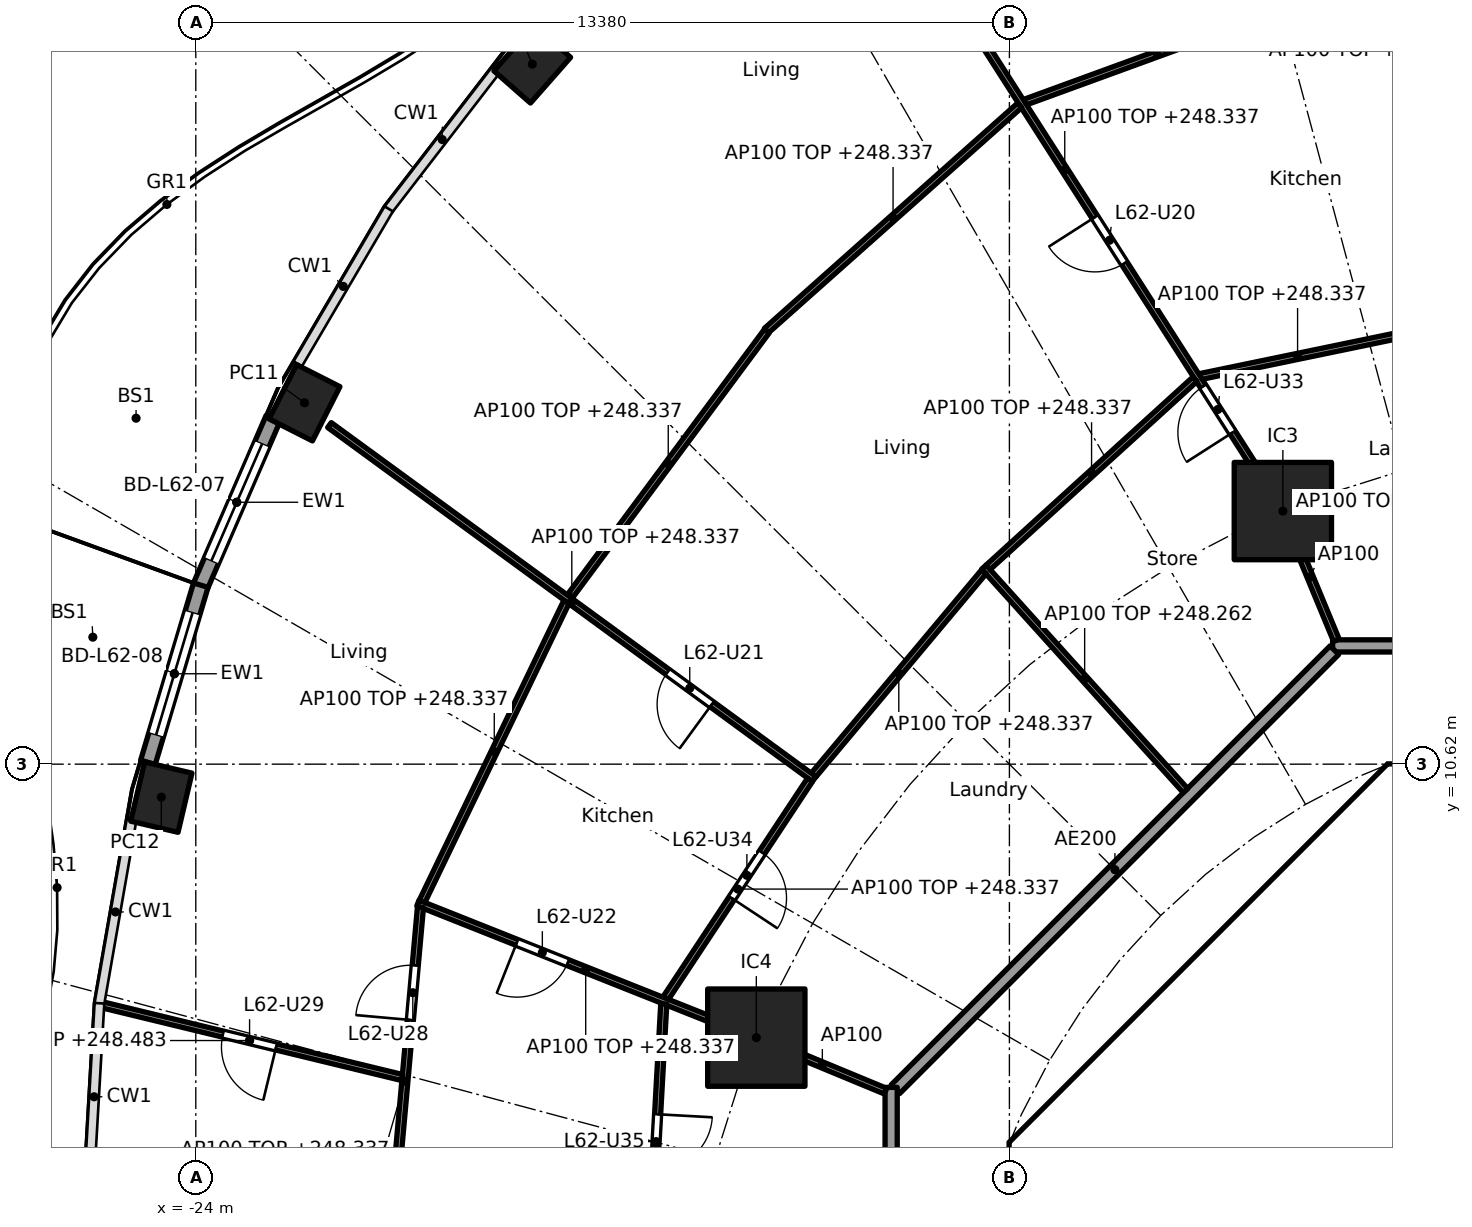
"""IFC4 building model, lengths in metres.
Left out: names, types, materials, properties, quantities, classifications, styles, units other than length and angle.
Written with IfcOpenShell. Run it as: python <this file> out.ifc"""

import sys

from ifc_helpers import new_model, si_unit, direction, frame, frame_2d, origin, origin_2d, place, context, subcontext, project, spatial, polyline, rectangle, hollow_rectangle, outline, extrude, element, fill, save


model = new_model("IFC4")
c1 = context("Model", 3, precision=1e-05, world=origin(), true_north=direction((0.0, 1.0)))
c2 = subcontext(c1, "Body", "Model", "MODEL_VIEW")
j1 = project(units=[si_unit("LENGTHUNIT", "METRE"), si_unit("PLANEANGLEUNIT", "RADIAN")], contexts=[c1])
p1 = place(None, origin())
s1 = spatial("IfcSite", under=j1, at=p1, CompositionType="ELEMENT")
p2 = place(p1, origin())
s2 = spatial("IfcBuilding", under=s1, at=p2, CompositionType="ELEMENT")
p3 = place(p2, frame((0.0, 0.0, 245.5)))
s3 = spatial("IfcBuildingStorey", under=s2, at=p3, CompositionType="ELEMENT", Elevation=245.5)
for number, where, z_axis, x_axis in (
    (1, (-18.467, 22.132, 0.0), (0.0, 0.0, 1.0), (-0.66, -0.751, 0.0)),
    (2, (-22.212, 16.563, 0.0), (0.0, 0.0, 1.0), (-0.452, -0.892, 0.0)),
    (3, (-24.567, 10.077, 0.0), (0.0, 0.0, 1.0), (-0.229, -0.973, 0.0)),
):
    element("IfcColumn", number, at=place(p3, frame(where, z_axis=z_axis, x_axis=x_axis)), inside=s3, PredefinedType="COLUMN", context=c2, shape_type="SweptSolid", body=[
        extrude(hollow_rectangle(XDim=1.0, YDim=0.8, WallThickness=0.032, at=origin_2d()), origin(), (0.0, 0.0, 1.0), 3.7),
    ])
for number, where, z_axis, x_axis in (
    (4, (-6.123, 14.782, 0.0), (0.0, 0.0, 1.0), (1.0, 0.0, 0.0)),
    (5, (-14.782, 6.123, 0.0), (0.0, 0.0, 1.0), (1.0, 0.0, 0.0)),
):
    element("IfcColumn", number, at=place(p3, frame(where, z_axis=z_axis, x_axis=x_axis)), inside=s3, PredefinedType="COLUMN", context=c2, shape_type="SweptSolid", body=[
        extrude(rectangle(XDim=1.6, YDim=1.6, at=origin_2d()), origin(), (0.0, 0.0, 1.0), 3.7),
    ])
p4 = place(p3, frame((-23.923, 13.55, 0.0), z_axis=(0.0, 0.0, 1.0), x_axis=(0.397685034628, 0.917521996048, 0.0)))
e6 = element("IfcWall", 6, at=p4, inside=s3, PredefinedType="SOLIDWALL", context=c2, shape_type="SweptSolid", body=[
    extrude(rectangle(XDim=3.002, YDim=0.25, at=frame_2d((1.501, 0.0))), origin(), (0.0, 0.0, 1.0), 3.44),
])
p5 = place(p4, frame((0.451, 0.0, 0.0)))
e7 = element("IfcOpeningElement", 7, at=p5, cuts=e6, PredefinedType="OPENING", context=c2, shape_type="SweptSolid", body=[
    extrude(rectangle(XDim=2.1, YDim=2.4, at=frame_2d((1.05, 1.2))), frame((0.0, 0.135, 0.0), z_axis=(0.0, -1.0, 0.0), x_axis=(1.0, 0.0, 0.0)), (0.0, 0.0, 1.0), 0.27),
])
p6 = place(p3, frame((-24.787, 10.65, 0.0), z_axis=(0.0, 0.0, 1.0), x_axis=(0.285859454825, 0.95827155446, 0.0)))
e8 = element("IfcWall", 8, at=p6, inside=s3, PredefinedType="SOLIDWALL", context=c2, shape_type="SweptSolid", body=[
    extrude(rectangle(XDim=3.041, YDim=0.25, at=frame_2d((1.52, 0.0))), origin(), (0.0, 0.0, 1.0), 3.44),
])
p7 = place(p6, frame((0.47, 0.0, 0.0)))
e9 = element("IfcOpeningElement", 9, at=p7, cuts=e8, PredefinedType="OPENING", context=c2, shape_type="SweptSolid", body=[
    extrude(rectangle(XDim=2.1, YDim=2.4, at=frame_2d((1.05, 1.2))), frame((0.0, 0.135, 0.0), z_axis=(0.0, -1.0, 0.0), x_axis=(1.0, 0.0, 0.0)), (0.0, 0.0, 1.0), 0.27),
])
p8 = place(p3, frame((-4.613, 9.988, 0.0), z_axis=(0.0, 0.0, 1.0), x_axis=(-0.707106781187, -0.707106781187, 0.0)))
e10 = element("IfcWall", 10, at=p8, inside=s3, PredefinedType="SHEAR", context=c2, shape_type="SweptSolid", body=[
    extrude(rectangle(XDim=7.602, YDim=0.6, at=frame_2d((3.801, 0.0))), origin(), (0.0, 0.0, 1.0), 3.44),
])
p9 = place(p8, frame((0.351, 0.0, 0.0)))
e11 = element("IfcOpeningElement", 11, at=p9, cuts=e10, PredefinedType="OPENING", context=c2, shape_type="SweptSolid", body=[
    extrude(rectangle(XDim=1.1, YDim=2.1, at=frame_2d((0.55, 1.05))), frame((0.0, 0.31, 0.0), z_axis=(0.0, -1.0, 0.0), x_axis=(1.0, 0.0, 0.0)), (0.0, 0.0, 1.0), 0.62),
])
p10 = place(p3, frame((-5.8, 4.3, 0.0), z_axis=(0.0, 0.0, 1.0), x_axis=(0.0, 1.0, 0.0)))
e12 = element("IfcWall", 12, at=p10, inside=s3, PredefinedType="PARTITIONING", context=c2, shape_type="SweptSolid", body=[
    extrude(rectangle(XDim=3.927, YDim=0.15, at=frame_2d((1.963, 0.0))), origin(), (0.0, 0.0, 1.0), 3.44),
])
p11 = place(p10, frame((0.413, 0.0, 0.0)))
e13 = element("IfcOpeningElement", 13, at=p11, cuts=e12, PredefinedType="OPENING", context=c2, shape_type="SweptSolid", body=[
    extrude(rectangle(XDim=0.9, YDim=2.1, at=frame_2d((0.45, 1.05))), frame((0.0, 0.085, 0.0), z_axis=(0.0, -1.0, 0.0), x_axis=(1.0, 0.0, 0.0)), (0.0, 0.0, 1.0), 0.17),
])
p12 = place(p10, frame((2.489, 0.0, 0.0)))
e14 = element("IfcOpeningElement", 14, at=p12, cuts=e12, PredefinedType="OPENING", context=c2, shape_type="SweptSolid", body=[
    extrude(rectangle(XDim=0.9, YDim=2.1, at=frame_2d((0.45, 1.05))), frame((0.0, 0.085, 0.0), z_axis=(0.0, -1.0, 0.0), x_axis=(1.0, 0.0, 0.0)), (0.0, 0.0, 1.0), 0.17),
])
p13 = place(p3, origin())
e15 = element("IfcWall", 15, at=p13, inside=s3, PredefinedType="SHEAR", context=c2, shape_type="SweptSolid", body=[
    extrude(outline(polyline([(-10.2, 4.825), (-9.776, 4.401), (-10.025, 4.152), (-10.025, 3.801), (-10.625, 3.801), (-10.625, 4.401), (-10.2, 4.825)])), origin(), (0.0, 0.0, 1.0), 3.44),
])
p14 = place(p3, origin())
e16 = element("IfcWall", 16, at=p14, inside=s3, PredefinedType="SHEAR", context=c2, shape_type="SweptSolid", body=[
    extrude(outline(polyline([(-4.152, 10.025), (-4.401, 9.776), (-4.825, 10.2), (-4.401, 10.625), (4.401, 10.625), (4.825, 10.2), (4.401, 9.776), (4.152, 10.025), (-4.152, 10.025)])), origin(), (0.0, 0.0, 1.0), 3.44),
])
p15 = place(p3, frame((-8.001, 6.1, 0.0), z_axis=(0.0, 0.0, 1.0), x_axis=(1.0, 0.0, 0.0)))
e17 = element("IfcWall", 17, at=p15, inside=s3, PredefinedType="PARTITIONING", context=c2, shape_type="SweptSolid", body=[
    extrude(rectangle(XDim=2.126, YDim=0.15, at=frame_2d((1.063, 0.0))), origin(), (0.0, 0.0, 1.0), 3.44),
])
p16 = place(p3, frame((5.104, 12.565, 0.0), z_axis=(0.0, 0.0, 1.0), x_axis=(-1.0, 0.0, 0.0)))
e18 = element("IfcWall", 18, at=p16, inside=s3, PredefinedType="PARTITIONING", context=c2, shape_type="SweptSolid", body=[
    extrude(rectangle(XDim=10.409, YDim=0.2, at=frame_2d((5.205, 0.0))), origin(), (0.0, 0.0, 1.0), 3.44),
])
p17 = place(p3, frame((-5.275, 12.494, 0.0), z_axis=(0.0, 0.0, 1.0), x_axis=(-0.707106781187, -0.707106781187, 0.0)))
e19 = element("IfcWall", 19, at=p17, inside=s3, PredefinedType="PARTITIONING", context=c2, shape_type="SweptSolid", body=[
    extrude(rectangle(XDim=10.209, YDim=0.2, at=frame_2d((5.104, 0.0))), origin(), (0.0, 0.0, 1.0), 3.44),
])
p18 = place(p3, frame((-12.565, 5.304, 0.0), z_axis=(0.0, 0.0, 1.0), x_axis=(0.0, -1.0, 0.0)))
e20 = element("IfcWall", 20, at=p18, inside=s3, PredefinedType="PARTITIONING", context=c2, shape_type="SweptSolid", body=[
    extrude(rectangle(XDim=10.409, YDim=0.2, at=frame_2d((5.205, 0.0))), origin(), (0.0, 0.0, 1.0), 3.44),
])
p19 = place(p3, frame((-4.28, 17.657, 0.0), z_axis=(0.0, 0.0, 1.0), x_axis=(-0.979205232861, -0.202872156637, 0.0)))
e21 = element("IfcWall", 21, at=p19, inside=s3, PredefinedType="PARTITIONING", context=c2, shape_type="SweptSolid", body=[
    extrude(rectangle(XDim=3.271, YDim=0.1, at=frame_2d((1.635, 0.0))), origin(), (0.0, 0.0, 1.0), 2.837),
])
p20 = place(p3, frame((-6.014, 23.094, 0.0), z_axis=(0.0, 0.0, 1.0), x_axis=(-0.939417400947, -0.342775359089, 0.0)))
e22 = element("IfcWall", 22, at=p20, inside=s3, PredefinedType="PARTITIONING", context=c2, shape_type="SweptSolid", body=[
    extrude(rectangle(XDim=4.633, YDim=0.1, at=frame_2d((2.316, 0.0))), origin(), (0.0, 0.0, 1.0), 2.837),
])
p21 = place(p3, frame((-5.243, 12.657, 0.0), z_axis=(0.0, 0.0, 1.0), x_axis=(-0.382757529444, 0.923848837015, 0.0)))
e23 = element("IfcWall", 23, at=p21, inside=s3, PredefinedType="PARTITIONING", context=c2, shape_type="SweptSolid", body=[
    extrude(rectangle(XDim=2.25, YDim=0.1, at=frame_2d((1.125, 0.0))), origin(), (0.0, 0.0, 1.0), 3.44),
])
p22 = place(p3, frame((-6.15, 14.824, 0.0), z_axis=(0.0, 0.0, 1.0), x_axis=(-0.538870687577, 0.842388498301, 0.0)))
e24 = element("IfcWall", 24, at=p22, inside=s3, PredefinedType="PARTITIONING", context=c2, shape_type="SweptSolid", body=[
    extrude(rectangle(XDim=13.213, YDim=0.1, at=frame_2d((6.606, 0.0))), origin(), (0.0, 0.0, 1.0), 2.837),
])
p23 = place(p22, frame((4.787, 0.0, 0.0)))
e25 = element("IfcOpeningElement", 25, at=p23, cuts=e24, PredefinedType="OPENING", context=c2, shape_type="SweptSolid", body=[
    extrude(rectangle(XDim=0.9, YDim=2.1, at=frame_2d((0.45, 1.05))), frame((0.0, 0.06, 0.0), z_axis=(0.0, -1.0, 0.0), x_axis=(1.0, 0.0, 0.0)), (0.0, 0.0, 1.0), 0.12),
])
p24 = place(p22, frame((10.112, 0.0, 0.0)))
e26 = element("IfcOpeningElement", 26, at=p24, cuts=e24, PredefinedType="OPENING", context=c2, shape_type="SweptSolid", body=[
    extrude(rectangle(XDim=0.9, YDim=2.1, at=frame_2d((0.45, 1.05))), frame((0.0, 0.06, 0.0), z_axis=(0.0, -1.0, 0.0), x_axis=(1.0, 0.0, 0.0)), (0.0, 0.0, 1.0), 0.12),
])
p25 = place(p22, frame((1.483, 0.0, 0.0)))
e27 = element("IfcOpeningElement", 27, at=p25, cuts=e24, PredefinedType="OPENING", context=c2, shape_type="SweptSolid", body=[
    extrude(rectangle(XDim=0.9, YDim=2.1, at=frame_2d((0.45, 1.05))), frame((0.0, 0.06, 0.0), z_axis=(0.0, -1.0, 0.0), x_axis=(1.0, 0.0, 0.0)), (0.0, 0.0, 1.0), 0.12),
])
p26 = place(p3, frame((-7.568, 16.95, 0.0), z_axis=(0.0, 0.0, 1.0), x_axis=(-0.739848749506, -0.672773236577, 0.0)))
e28 = element("IfcWall", 28, at=p26, inside=s3, PredefinedType="PARTITIONING", context=c2, shape_type="SweptSolid", body=[
    extrude(rectangle(XDim=4.597, YDim=0.1, at=frame_2d((2.299, 0.0))), origin(), (0.0, 0.0, 1.0), 2.837),
])
p27 = place(p3, frame((-10.45, 21.455, 0.0), z_axis=(0.0, 0.0, 1.0), x_axis=(-0.747155565726, -0.664649201162, 0.0)))
e29 = element("IfcWall", 29, at=p27, inside=s3, PredefinedType="PARTITIONING", context=c2, shape_type="SweptSolid", body=[
    extrude(rectangle(XDim=5.575, YDim=0.1, at=frame_2d((2.788, 0.0))), origin(), (0.0, 0.0, 1.0), 2.837),
])
p28 = place(p3, frame((-7.725, 10.186, 0.0), z_axis=(0.0, 0.0, 1.0), x_axis=(-0.669817301526, 0.742525947409, 0.0)))
e30 = element("IfcWall", 30, at=p28, inside=s3, PredefinedType="PARTITIONING", context=c2, shape_type="SweptSolid", body=[
    extrude(rectangle(XDim=4.949, YDim=0.1, at=frame_2d((2.475, 0.0))), origin(), (0.0, 0.0, 1.0), 2.762),
])
p29 = place(p3, frame((-11.039, 13.785, 0.0), z_axis=(0.0, 0.0, 1.0), x_axis=(-0.642258090087, -0.766488451131, 0.0)))
e31 = element("IfcWall", 31, at=p29, inside=s3, PredefinedType="PARTITIONING", context=c2, shape_type="SweptSolid", body=[
    extrude(rectangle(XDim=4.361, YDim=0.1, at=frame_2d((2.18, 0.0))), origin(), (0.0, 0.0, 1.0), 2.837),
])
p30 = place(p3, frame((-14.608, 17.743, 0.0), z_axis=(0.0, 0.0, 1.0), x_axis=(-0.596174489482, -0.8028548923, 0.0)))
e32 = element("IfcWall", 32, at=p30, inside=s3, PredefinedType="PARTITIONING", context=c2, shape_type="SweptSolid", body=[
    extrude(rectangle(XDim=5.442, YDim=0.1, at=frame_2d((2.721, 0.0))), origin(), (0.0, 0.0, 1.0), 2.837),
])
p31 = place(p3, frame((-13.831, 10.375, 0.0), z_axis=(0.0, 0.0, 1.0), x_axis=(-0.807534306161, 0.589820603551, 0.0)))
e33 = element("IfcWall", 33, at=p31, inside=s3, PredefinedType="PARTITIONING", context=c2, shape_type="SweptSolid", body=[
    extrude(rectangle(XDim=9.87, YDim=0.1, at=frame_2d((4.935, 0.0))), origin(), (0.0, 0.0, 1.0), 2.837),
])
p32 = place(p31, frame((2.083, 0.0, 0.0)))
e34 = element("IfcOpeningElement", 34, at=p32, cuts=e33, PredefinedType="OPENING", context=c2, shape_type="SweptSolid", body=[
    extrude(rectangle(XDim=0.9, YDim=2.1, at=frame_2d((0.45, 1.05))), frame((0.0, 0.06, 0.0), z_axis=(0.0, -1.0, 0.0), x_axis=(1.0, 0.0, 0.0)), (0.0, 0.0, 1.0), 0.12),
])
p33 = place(p3, frame((-13.899, 10.363, 0.0), z_axis=(0.0, 0.0, 1.0), x_axis=(-0.551268538455, -0.834327872308, 0.0)))
e35 = element("IfcWall", 35, at=p33, inside=s3, PredefinedType="PARTITIONING", context=c2, shape_type="SweptSolid", body=[
    extrude(rectangle(XDim=4.307, YDim=0.1, at=frame_2d((2.154, 0.0))), origin(), (0.0, 0.0, 1.0), 2.837),
])
p34 = place(p33, frame((1.433, 0.0, 0.0)))
e36 = element("IfcOpeningElement", 36, at=p34, cuts=e35, PredefinedType="OPENING", context=c2, shape_type="SweptSolid", body=[
    extrude(rectangle(XDim=0.9, YDim=2.1, at=frame_2d((0.45, 1.05))), frame((0.0, 0.06, 0.0), z_axis=(0.0, -1.0, 0.0), x_axis=(1.0, 0.0, 0.0)), (0.0, 0.0, 1.0), 0.12),
])
p35 = place(p3, frame((-17.904, 13.289, 0.0), z_axis=(0.0, 0.0, 1.0), x_axis=(-0.434292070406, -0.900772111903, 0.0)))
e37 = element("IfcWall", 37, at=p35, inside=s3, PredefinedType="PARTITIONING", context=c2, shape_type="SweptSolid", body=[
    extrude(rectangle(XDim=5.469, YDim=0.1, at=frame_2d((2.734, 0.0))), origin(), (0.0, 0.0, 1.0), 2.837),
])
p36 = place(p3, frame((-12.657, 5.243, 0.0), z_axis=(0.0, 0.0, 1.0), x_axis=(-0.923871314276, 0.382703272338, 0.0)))
e38 = element("IfcWall", 38, at=p36, inside=s3, PredefinedType="PARTITIONING", context=c2, shape_type="SweptSolid", body=[
    extrude(rectangle(XDim=2.249, YDim=0.1, at=frame_2d((1.125, 0.0))), origin(), (0.0, 0.0, 1.0), 3.44),
])
p37 = place(p3, frame((-14.829, 6.141, 0.0), z_axis=(0.0, 0.0, 1.0), x_axis=(-0.92919221305, 0.369596849563, 0.0)))
e39 = element("IfcWall", 39, at=p37, inside=s3, PredefinedType="PARTITIONING", context=c2, shape_type="SweptSolid", body=[
    extrude(rectangle(XDim=5.939, YDim=0.1, at=frame_2d((2.97, 0.0))), origin(), (0.0, 0.0, 1.0), 2.837),
])
p38 = place(p37, frame((3.287, 0.0, 0.0)))
e40 = element("IfcOpeningElement", 40, at=p38, cuts=e39, PredefinedType="OPENING", context=c2, shape_type="SweptSolid", body=[
    extrude(rectangle(XDim=0.9, YDim=2.1, at=frame_2d((0.45, 1.05))), frame((0.0, 0.06, 0.0), z_axis=(0.0, -1.0, 0.0), x_axis=(1.0, 0.0, 0.0)), (0.0, 0.0, 1.0), 0.12),
])
p39 = place(p3, frame((-16.304, 6.677, 0.0), z_axis=(0.0, 0.0, 1.0), x_axis=(-0.055596844869, -0.998453299279, 0.0)))
e41 = element("IfcWall", 41, at=p39, inside=s3, PredefinedType="PARTITIONING", context=c2, shape_type="SweptSolid", body=[
    extrude(rectangle(XDim=4.584, YDim=0.1, at=frame_2d((2.292, 0.0))), origin(), (0.0, 0.0, 1.0), 2.837),
])
p40 = place(p39, frame((1.817, 0.0, 0.0)))
e42 = element("IfcOpeningElement", 42, at=p40, cuts=e41, PredefinedType="OPENING", context=c2, shape_type="SweptSolid", body=[
    extrude(rectangle(XDim=0.9, YDim=2.1, at=frame_2d((0.45, 1.05))), frame((0.0, 0.06, 0.0), z_axis=(0.0, -1.0, 0.0), x_axis=(1.0, 0.0, 0.0)), (0.0, 0.0, 1.0), 0.12),
])
p41 = place(p3, frame((-20.305, 8.268, 0.0), z_axis=(0.0, 0.0, 1.0), x_axis=(-0.089272015533, -0.996007282726, 0.0)))
e43 = element("IfcWall", 43, at=p41, inside=s3, PredefinedType="PARTITIONING", context=c2, shape_type="SweptSolid", body=[
    extrude(rectangle(XDim=5.749, YDim=0.1, at=frame_2d((2.874, 0.0))), origin(), (0.0, 0.0, 1.0), 2.837),
])
p42 = place(p41, frame((0.962, 0.0, 0.0)))
e44 = element("IfcOpeningElement", 44, at=p42, cuts=e43, PredefinedType="OPENING", context=c2, shape_type="SweptSolid", body=[
    extrude(rectangle(XDim=0.9, YDim=2.1, at=frame_2d((0.45, 1.05))), frame((0.0, 0.06, 0.0), z_axis=(0.0, -1.0, 0.0), x_axis=(1.0, 0.0, 0.0)), (0.0, 0.0, 1.0), 0.12),
])
p43 = place(p3, frame((-20.606, 5.467, 0.0), z_axis=(0.0, 0.0, 1.0), x_axis=(-0.971860928388, 0.235555377507, 0.0)))
e45 = element("IfcWall", 45, at=p43, inside=s3, PredefinedType="PARTITIONING", context=c2, shape_type="SweptSolid", body=[
    extrude(rectangle(XDim=5.165, YDim=0.1, at=frame_2d((2.582, 0.0))), origin(), (0.0, 0.0, 1.0), 2.983),
])
p44 = place(p43, frame((2.132, 0.0, 0.0)))
e46 = element("IfcOpeningElement", 46, at=p44, cuts=e45, PredefinedType="OPENING", context=c2, shape_type="SweptSolid", body=[
    extrude(rectangle(XDim=0.9, YDim=2.1, at=frame_2d((0.45, 1.05))), frame((0.0, 0.06, 0.0), z_axis=(0.0, -1.0, 0.0), x_axis=(1.0, 0.0, 0.0)), (0.0, 0.0, 1.0), 0.12),
])
p45 = place(p5, origin())
e47 = element("IfcDoor", 47, at=p45, inside=s3, OperationType="SLIDING_TO_LEFT", PredefinedType="DOOR", context=c2, shape_type="SweptSolid", body=[
    extrude(rectangle(XDim=2.1, YDim=2.4, at=frame_2d((1.05, 1.2))), frame((0.0, 0.025, 0.0), z_axis=(0.0, -1.0, 0.0), x_axis=(1.0, 0.0, 0.0)), (0.0, 0.0, 1.0), 0.05),
])
fill(e7, e47)
p46 = place(p7, origin())
e48 = element("IfcDoor", 48, at=p46, inside=s3, OperationType="SLIDING_TO_LEFT", PredefinedType="DOOR", context=c2, shape_type="SweptSolid", body=[
    extrude(rectangle(XDim=2.1, YDim=2.4, at=frame_2d((1.05, 1.2))), frame((0.0, 0.025, 0.0), z_axis=(0.0, -1.0, 0.0), x_axis=(1.0, 0.0, 0.0)), (0.0, 0.0, 1.0), 0.05),
])
fill(e9, e48)
p47 = place(p11, origin())
e49 = element("IfcDoor", 49, at=p47, inside=s3, OperationType="SINGLE_SWING_LEFT", PredefinedType="DOOR", context=c2, shape_type="SweptSolid", body=[
    extrude(rectangle(XDim=0.9, YDim=2.1, at=frame_2d((0.45, 1.05))), frame((0.0, 0.025, 0.0), z_axis=(0.0, -1.0, 0.0), x_axis=(1.0, 0.0, 0.0)), (0.0, 0.0, 1.0), 0.05),
])
fill(e13, e49)
p48 = place(p12, origin())
e50 = element("IfcDoor", 50, at=p48, inside=s3, OperationType="SINGLE_SWING_LEFT", PredefinedType="DOOR", context=c2, shape_type="SweptSolid", body=[
    extrude(rectangle(XDim=0.9, YDim=2.1, at=frame_2d((0.45, 1.05))), frame((0.0, 0.025, 0.0), z_axis=(0.0, -1.0, 0.0), x_axis=(1.0, 0.0, 0.0)), (0.0, 0.0, 1.0), 0.05),
])
fill(e14, e50)
p49 = place(p9, origin())
e51 = element("IfcDoor", 51, at=p49, inside=s3, OperationType="SINGLE_SWING_RIGHT", PredefinedType="DOOR", context=c2, shape_type="SweptSolid", body=[
    extrude(rectangle(XDim=1.1, YDim=2.1, at=frame_2d((0.55, 1.05))), frame((0.0, 0.025, 0.0), z_axis=(0.0, -1.0, 0.0), x_axis=(1.0, 0.0, 0.0)), (0.0, 0.0, 1.0), 0.05),
])
fill(e11, e51)
p50 = place(p23, origin())
e52 = element("IfcDoor", 52, at=p50, inside=s3, OperationType="SINGLE_SWING_RIGHT", PredefinedType="DOOR", context=c2, shape_type="SweptSolid", body=[
    extrude(rectangle(XDim=0.9, YDim=2.1, at=frame_2d((0.45, 1.05))), frame((0.0, 0.025, 0.0), z_axis=(0.0, -1.0, 0.0), x_axis=(1.0, 0.0, 0.0)), (0.0, 0.0, 1.0), 0.05),
])
fill(e25, e52)
p51 = place(p32, origin())
e53 = element("IfcDoor", 53, at=p51, inside=s3, OperationType="SINGLE_SWING_LEFT", PredefinedType="DOOR", context=c2, shape_type="SweptSolid", body=[
    extrude(rectangle(XDim=0.9, YDim=2.1, at=frame_2d((0.45, 1.05))), frame((0.0, 0.025, 0.0), z_axis=(0.0, -1.0, 0.0), x_axis=(1.0, 0.0, 0.0)), (0.0, 0.0, 1.0), 0.05),
])
fill(e34, e53)
p52 = place(p38, origin())
e54 = element("IfcDoor", 54, at=p52, inside=s3, OperationType="SINGLE_SWING_RIGHT", PredefinedType="DOOR", context=c2, shape_type="SweptSolid", body=[
    extrude(rectangle(XDim=0.9, YDim=2.1, at=frame_2d((0.45, 1.05))), frame((0.0, 0.025, 0.0), z_axis=(0.0, -1.0, 0.0), x_axis=(1.0, 0.0, 0.0)), (0.0, 0.0, 1.0), 0.05),
])
fill(e40, e54)
p53 = place(p42, frame((0.9, 0.0, 0.0), x_axis=(-1.0, 0.0, 0.0)))
e55 = element("IfcDoor", 55, at=p53, inside=s3, OperationType="SINGLE_SWING_LEFT", PredefinedType="DOOR", context=c2, shape_type="SweptSolid", body=[
    extrude(rectangle(XDim=0.9, YDim=2.1, at=frame_2d((0.45, 1.05))), frame((0.0, 0.025, 0.0), z_axis=(0.0, -1.0, 0.0), x_axis=(1.0, 0.0, 0.0)), (0.0, 0.0, 1.0), 0.05),
])
fill(e44, e55)
p54 = place(p44, origin())
e56 = element("IfcDoor", 56, at=p54, inside=s3, OperationType="SINGLE_SWING_LEFT", PredefinedType="DOOR", context=c2, shape_type="SweptSolid", body=[
    extrude(rectangle(XDim=0.9, YDim=2.1, at=frame_2d((0.45, 1.05))), frame((0.0, 0.025, 0.0), z_axis=(0.0, -1.0, 0.0), x_axis=(1.0, 0.0, 0.0)), (0.0, 0.0, 1.0), 0.05),
])
fill(e46, e56)
p55 = place(p25, origin())
e57 = element("IfcDoor", 57, at=p55, inside=s3, OperationType="SINGLE_SWING_LEFT", PredefinedType="DOOR", context=c2, shape_type="SweptSolid", body=[
    extrude(rectangle(XDim=0.9, YDim=2.1, at=frame_2d((0.45, 1.05))), frame((0.0, 0.025, 0.0), z_axis=(0.0, -1.0, 0.0), x_axis=(1.0, 0.0, 0.0)), (0.0, 0.0, 1.0), 0.05),
])
fill(e27, e57)
p56 = place(p34, origin())
e58 = element("IfcDoor", 58, at=p56, inside=s3, OperationType="SINGLE_SWING_RIGHT", PredefinedType="DOOR", context=c2, shape_type="SweptSolid", body=[
    extrude(rectangle(XDim=0.9, YDim=2.1, at=frame_2d((0.45, 1.05))), frame((0.0, 0.025, 0.0), z_axis=(0.0, -1.0, 0.0), x_axis=(1.0, 0.0, 0.0)), (0.0, 0.0, 1.0), 0.05),
])
fill(e36, e58)
p57 = place(p40, origin())
e59 = element("IfcDoor", 59, at=p57, inside=s3, OperationType="SINGLE_SWING_LEFT", PredefinedType="DOOR", context=c2, shape_type="SweptSolid", body=[
    extrude(rectangle(XDim=0.9, YDim=2.1, at=frame_2d((0.45, 1.05))), frame((0.0, 0.025, 0.0), z_axis=(0.0, -1.0, 0.0), x_axis=(1.0, 0.0, 0.0)), (0.0, 0.0, 1.0), 0.05),
])
fill(e42, e59)
save(model, sys.argv[1])
